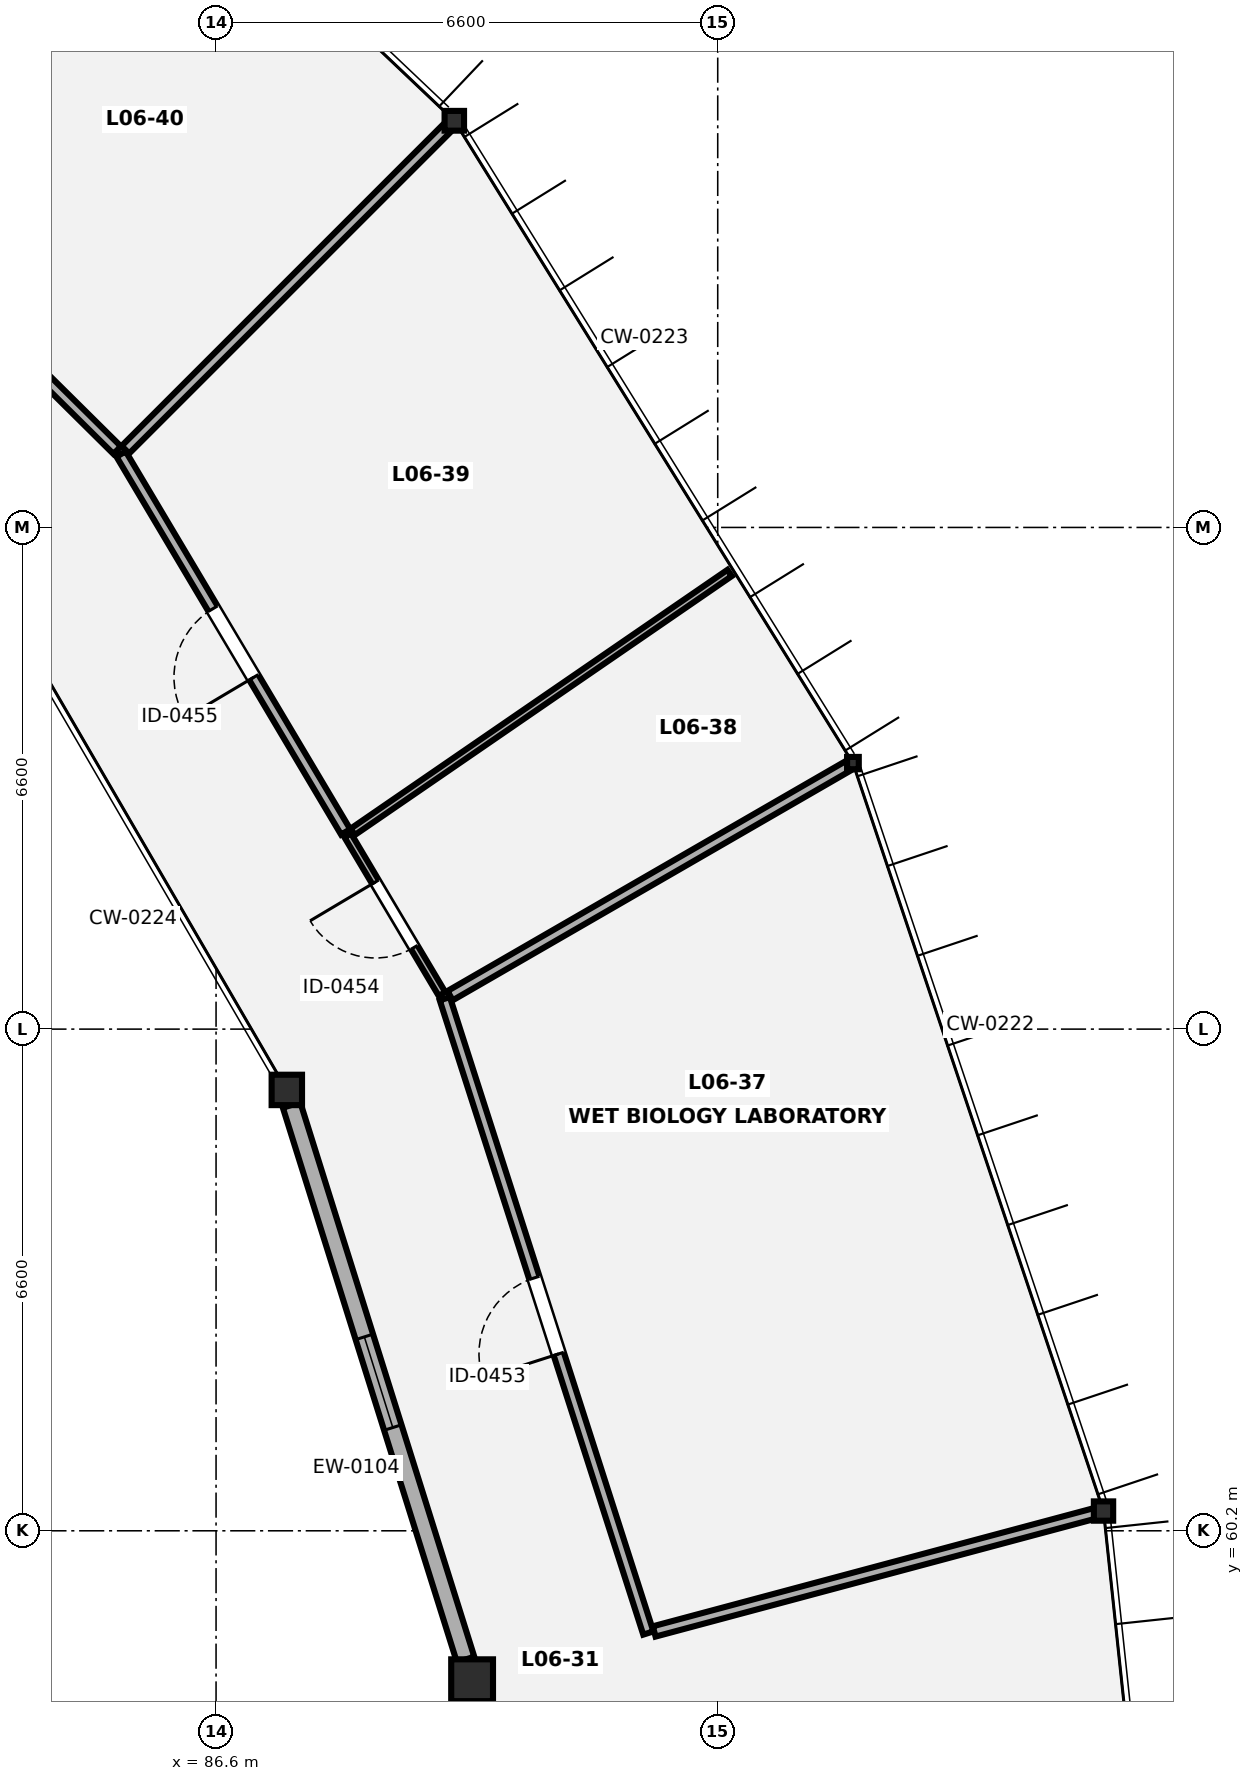
"""IFC4 building model, lengths in metres.
Left out: names, types, materials, properties, quantities, classifications, styles, units other than length and angle.
Written with IfcOpenShell. Run it as: python <this file> out.ifc"""

import sys

from ifc_helpers import new_model, si_unit, direction, frame, frame_2d, origin, origin_2d, place, context, subcontext, project, spatial, rectangle, i_section, extrude, element, fill, save


model = new_model("IFC4")
c1 = context("Model", 3, precision=1e-05, world=origin(), true_north=direction((0.0, 1.0)))
c2 = subcontext(c1, "Body", "Model", "MODEL_VIEW")
j1 = project(units=[si_unit("LENGTHUNIT", "METRE"), si_unit("PLANEANGLEUNIT", "RADIAN")], contexts=[c1])
p1 = place(None, origin())
s1 = spatial("IfcSite", under=j1, at=p1, CompositionType="ELEMENT")
p2 = place(p1, origin())
s2 = spatial("IfcBuilding", under=s1, at=p2, CompositionType="ELEMENT")
p3 = place(p2, frame((0.0, 0.0, 25.9)))
s3 = spatial("IfcBuildingStorey", under=s2, at=p3, CompositionType="ELEMENT", Elevation=25.9)
p4 = place(p3, frame((98.276, 60.46, 0.0), z_axis=(0.0, 0.0, 1.0), x_axis=(1.0, 0.0, 0.0)))
e1 = element("IfcColumn", 1, at=p4, inside=s3, PredefinedType="COLUMN", context=c2, shape_type="SweptSolid", body=[
    extrude(i_section(OverallWidth=0.254, OverallDepth=0.254, WebThickness=0.009, FlangeThickness=0.014, FilletRadius=0.014, at=origin_2d()), origin(), (0.0, 0.0, 1.0), 4.2),
])
p5 = place(p3, frame((89.969, 58.234, 0.0), z_axis=(0.0, 0.0, 1.0), x_axis=(1.0, 0.0, 0.0)))
e2 = element("IfcColumn", 2, at=p5, inside=s3, PredefinedType="COLUMN", context=c2, shape_type="SweptSolid", body=[
    extrude(rectangle(XDim=0.55, YDim=0.55, at=origin_2d()), origin(), (0.0, 0.0, 1.0), 4.2),
])
p6 = place(p3, frame((94.979, 70.3, 0.0), z_axis=(0.0, 0.0, 1.0), x_axis=(1.0, 0.0, 0.0)))
e3 = element("IfcColumn", 3, at=p6, inside=s3, PredefinedType="COLUMN", context=c2, shape_type="SweptSolid", body=[
    extrude(i_section(OverallWidth=0.154, OverallDepth=0.162, WebThickness=0.008, FlangeThickness=0.011, FilletRadius=0.009, at=origin_2d()), origin(), (0.0, 0.0, 1.0), 4.2),
])
p7 = place(p3, frame((87.531, 66.0, 0.0), z_axis=(0.0, 0.0, 1.0), x_axis=(1.0, 0.0, 0.0)))
e4 = element("IfcColumn", 4, at=p7, inside=s3, PredefinedType="PILASTER", context=c2, shape_type="SweptSolid", body=[
    extrude(rectangle(XDim=0.4, YDim=0.4, at=origin_2d()), origin(), (0.0, 0.0, 1.0), 4.2),
])
p8 = place(p3, frame((89.735, 78.75, 0.0), z_axis=(0.0, 0.0, 1.0), x_axis=(1.0, 0.0, 0.0)))
e5 = element("IfcColumn", 5, at=p8, inside=s3, PredefinedType="COLUMN", context=c2, shape_type="SweptSolid", body=[
    extrude(i_section(OverallWidth=0.256, OverallDepth=0.26, WebThickness=0.01, FlangeThickness=0.017, FilletRadius=0.014, at=origin_2d()), origin(), (0.0, 0.0, 1.0), 4.2),
])
p9 = place(p3, frame((89.883, 58.507, 0.0), z_axis=(0.0, 0.0, 1.0), x_axis=(-0.299452933333, 0.954111073575, 0.0)))
e6 = element("IfcWall", 6, at=p9, inside=s3, PredefinedType="SOLIDWALL", context=c2, shape_type="SweptSolid", body=[
    extrude(rectangle(XDim=7.646, YDim=0.24, at=frame_2d((3.823, 0.0))), origin(), (0.0, 0.0, 1.0), 3.65),
])
p10 = place(p9, frame((3.198, 0.0, 0.85)))
e7 = element("IfcOpeningElement", 7, at=p10, cuts=e6, PredefinedType="OPENING", context=c2, shape_type="SweptSolid", body=[
    extrude(rectangle(XDim=1.25, YDim=1.4, at=frame_2d((0.625, 0.7))), frame((0.0, 0.13, 0.0), z_axis=(0.0, -1.0, 0.0), x_axis=(1.0, 0.0, 0.0)), (0.0, 0.0, 1.0), 0.26),
])
p11 = place(p3, frame((92.287, 58.855, 0.0), z_axis=(0.0, 0.0, 1.0), x_axis=(-0.30548522006, 0.952196818061, 0.0)))
e8 = element("IfcWall", 8, at=p11, inside=s3, PredefinedType="PARTITIONING", context=c2, shape_type="SweptSolid", body=[
    extrude(rectangle(XDim=8.764, YDim=0.14, at=frame_2d((4.382, 0.0))), origin(), (0.0, 0.0, 1.0), 4.0),
])
p12 = place(p11, frame((3.857, 0.0, 0.0)))
e9 = element("IfcOpeningElement", 9, at=p12, cuts=e8, PredefinedType="OPENING", context=c2, shape_type="SweptSolid", body=[
    extrude(rectangle(XDim=1.05, YDim=2.15, at=frame_2d((0.525, 1.075))), frame((0.0, 0.08, 0.0), z_axis=(0.0, -1.0, 0.0), x_axis=(1.0, 0.0, 0.0)), (0.0, 0.0, 1.0), 0.16),
])
p13 = place(p3, frame((92.364, 58.876, 0.0), z_axis=(0.0, 0.0, 1.0), x_axis=(0.96591927772, 0.258843483457, 0.0)))
e10 = element("IfcWall", 10, at=p13, inside=s3, PredefinedType="PARTITIONING", context=c2, shape_type="SweptSolid", body=[
    extrude(rectangle(XDim=6.06, YDim=0.14, at=frame_2d((3.03, 0.0))), origin(), (0.0, 0.0, 1.0), 3.323),
])
p14 = place(p3, frame((89.679, 67.24, 0.0), z_axis=(0.0, 0.0, 1.0), x_axis=(0.866020543329, 0.500008418462, 0.0)))
e11 = element("IfcWall", 11, at=p14, inside=s3, PredefinedType="PARTITIONING", context=c2, shape_type="SweptSolid", body=[
    extrude(rectangle(XDim=6.06, YDim=0.14, at=frame_2d((3.03, 0.0))), origin(), (0.0, 0.0, 1.0), 3.471),
])
p15 = place(p3, frame((89.573, 67.262, 0.0), z_axis=(0.0, 0.0, 1.0), x_axis=(-0.510928867953, 0.859622994046, 0.0)))
e12 = element("IfcWall", 12, at=p15, inside=s3, PredefinedType="PARTITIONING", context=c2, shape_type="SweptSolid", body=[
    extrude(rectangle(XDim=2.429, YDim=0.1, at=frame_2d((1.214, 0.0))), origin(), (0.0, 0.0, 1.0), 4.0),
])
p16 = place(p15, frame((0.714, 0.0, 0.0)))
e13 = element("IfcOpeningElement", 13, at=p16, cuts=e12, PredefinedType="OPENING", context=c2, shape_type="SweptSolid", body=[
    extrude(rectangle(XDim=1.0, YDim=2.1, at=frame_2d((0.5, 1.05))), frame((0.0, 0.06, 0.0), z_axis=(0.0, -1.0, 0.0), x_axis=(1.0, 0.0, 0.0)), (0.0, 0.0, 1.0), 0.12),
])
p17 = place(p3, frame((88.398, 69.395, 0.0), z_axis=(0.0, 0.0, 1.0), x_axis=(0.824271584206, 0.566194626847, 0.0)))
e14 = element("IfcWall", 14, at=p17, inside=s3, PredefinedType="PARTITIONING", context=c2, shape_type="SweptSolid", body=[
    extrude(rectangle(XDim=6.016, YDim=0.1, at=frame_2d((3.008, 0.0))), origin(), (0.0, 0.0, 1.0), 4.0),
])
p18 = place(p3, frame((88.305, 69.395, 0.0), z_axis=(0.0, 0.0, 1.0), x_axis=(-0.510896676259, 0.859642126811, 0.0)))
e15 = element("IfcWall", 15, at=p18, inside=s3, PredefinedType="PARTITIONING", context=c2, shape_type="SweptSolid", body=[
    extrude(rectangle(XDim=5.783, YDim=0.14, at=frame_2d((2.892, 0.0))), origin(), (0.0, 0.0, 1.0), 4.0),
])
p19 = place(p18, frame((2.366, 0.0, 0.0)))
e16 = element("IfcOpeningElement", 16, at=p19, cuts=e15, PredefinedType="OPENING", context=c2, shape_type="SweptSolid", body=[
    extrude(rectangle(XDim=1.05, YDim=2.15, at=frame_2d((0.525, 1.075))), frame((0.0, 0.08, 0.0), z_axis=(0.0, -1.0, 0.0), x_axis=(1.0, 0.0, 0.0)), (0.0, 0.0, 1.0), 0.16),
])
p20 = place(p3, frame((85.407, 74.423, 0.0), z_axis=(0.0, 0.0, 1.0), x_axis=(0.70712692467, 0.707086637129, 0.0)))
e17 = element("IfcWall", 17, at=p20, inside=s3, PredefinedType="PARTITIONING", context=c2, shape_type="SweptSolid", body=[
    extrude(rectangle(XDim=6.06, YDim=0.14, at=frame_2d((3.03, 0.0))), origin(), (0.0, 0.0, 1.0), 3.465),
])
p21 = place(p3, frame((85.299, 74.417, 0.0), z_axis=(0.0, 0.0, 1.0), x_axis=(-0.710410596589, 0.703787456732, 0.0)))
e18 = element("IfcWall", 18, at=p21, inside=s3, PredefinedType="PARTITIONING", context=c2, shape_type="SweptSolid", body=[
    extrude(rectangle(XDim=7.741, YDim=0.14, at=frame_2d((3.871, 0.0))), origin(), (0.0, 0.0, 1.0), 4.0),
])
p22 = place(p21, frame((3.345, 0.0, 0.0)))
e19 = element("IfcOpeningElement", 19, at=p22, cuts=e18, PredefinedType="OPENING", context=c2, shape_type="SweptSolid", body=[
    extrude(rectangle(XDim=1.05, YDim=2.15, at=frame_2d((0.525, 1.075))), frame((0.0, 0.08, 0.0), z_axis=(0.0, -1.0, 0.0), x_axis=(1.0, 0.0, 0.0)), (0.0, 0.0, 1.0), 0.16),
])
p23 = place(p10, origin())
e20 = element("IfcWindow", 20, at=p23, inside=s3, PartitioningType="SINGLE_PANEL", PredefinedType="WINDOW", context=c2, shape_type="SweptSolid", body=[
    extrude(rectangle(XDim=1.25, YDim=1.4, at=frame_2d((0.625, 0.7))), frame((0.0, 0.03, 0.0), z_axis=(0.0, -1.0, 0.0), x_axis=(1.0, 0.0, 0.0)), (0.0, 0.0, 1.0), 0.06),
])
fill(e7, e20)
p24 = place(p12, origin())
e21 = element("IfcDoor", 21, at=p24, inside=s3, OperationType="SINGLE_SWING_LEFT", PredefinedType="DOOR", context=c2, shape_type="SweptSolid", body=[
    extrude(rectangle(XDim=1.05, YDim=2.15, at=frame_2d((0.525, 1.075))), frame((0.0, 0.025, 0.0), z_axis=(0.0, -1.0, 0.0), x_axis=(1.0, 0.0, 0.0)), (0.0, 0.0, 1.0), 0.05),
])
fill(e9, e21)
p25 = place(p16, origin())
e22 = element("IfcDoor", 22, at=p25, inside=s3, OperationType="SINGLE_SWING_RIGHT", PredefinedType="DOOR", context=c2, shape_type="SweptSolid", body=[
    extrude(rectangle(XDim=1.0, YDim=2.1, at=frame_2d((0.5, 1.05))), frame((0.0, 0.025, 0.0), z_axis=(0.0, -1.0, 0.0), x_axis=(1.0, 0.0, 0.0)), (0.0, 0.0, 1.0), 0.05),
])
fill(e13, e22)
p26 = place(p19, origin())
e23 = element("IfcDoor", 23, at=p26, inside=s3, OperationType="SINGLE_SWING_LEFT", PredefinedType="DOOR", context=c2, shape_type="SweptSolid", body=[
    extrude(rectangle(XDim=1.05, YDim=2.15, at=frame_2d((0.525, 1.075))), frame((0.0, 0.025, 0.0), z_axis=(0.0, -1.0, 0.0), x_axis=(1.0, 0.0, 0.0)), (0.0, 0.0, 1.0), 0.05),
])
fill(e16, e23)
save(model, sys.argv[1])
